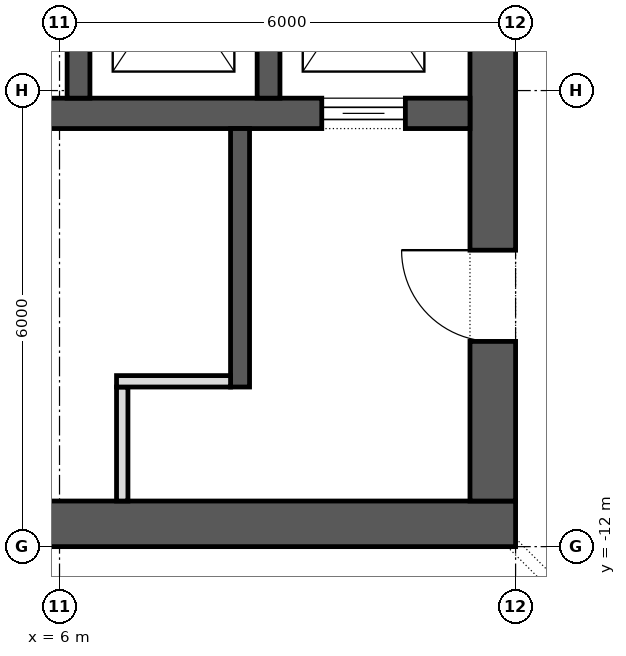
"""IFC4 building model, lengths in metres.
Left out: names, types, materials, properties, quantities, classifications, styles, units other than length and angle.
Written with IfcOpenShell. Run it as: python <this file> out.ifc"""

import sys

from ifc_helpers import new_model, si_unit, direction, frame, frame_2d, origin, place, context, subcontext, project, spatial, rectangle, extrude, element, fill, save


model = new_model("IFC4")
c1 = context("Model", 3, precision=1e-05, world=origin(), true_north=direction((0.0, 1.0)))
c2 = subcontext(c1, "Body", "Model", "MODEL_VIEW")
j1 = project(units=[si_unit("LENGTHUNIT", "METRE"), si_unit("PLANEANGLEUNIT", "RADIAN")], contexts=[c1])
p1 = place(None, origin())
s1 = spatial("IfcSite", under=j1, at=p1, CompositionType="ELEMENT")
p2 = place(p1, origin())
s2 = spatial("IfcBuilding", under=s1, at=p2, CompositionType="ELEMENT")
p3 = place(p2, frame((0.0, 0.0, -15.0)))
s3 = spatial("IfcBuildingStorey", under=s2, at=p3, CompositionType="ELEMENT", Elevation=-15.0)
p4 = place(p3, frame((-12.0, -11.7, 0.0), z_axis=(0.0, 0.0, 1.0), x_axis=(1.0, 0.0, 0.0)))
e1 = element("IfcWall", 1, at=p4, inside=s3, PredefinedType="SHEAR", context=c2, shape_type="SweptSolid", body=[
    extrude(rectangle(XDim=24.0, YDim=0.6, at=frame_2d((12.0, 0.0))), origin(), (0.0, 0.0, 1.0), 5.5),
])
p5 = place(p4, frame((11.6, 0.0, 0.0)))
e2 = element("IfcOpeningElement", 2, at=p5, cuts=e1, PredefinedType="OPENING", context=c2, shape_type="SweptSolid", body=[
    extrude(rectangle(XDim=0.8, YDim=2.1, at=frame_2d((0.4, 1.05))), frame((0.0, 0.312, 0.0), z_axis=(0.0, -1.0, 0.0), x_axis=(1.0, 0.0, 0.0)), (0.0, 0.0, 1.0), 0.624),
])
p6 = place(p3, frame((11.7, -11.4, 0.0), z_axis=(0.0, 0.0, 1.0), x_axis=(0.0, 1.0, 0.0)))
e3 = element("IfcWall", 3, at=p6, inside=s3, PredefinedType="SHEAR", context=c2, shape_type="SweptSolid", body=[
    extrude(rectangle(XDim=22.8, YDim=0.6, at=frame_2d((11.4, 0.0))), origin(), (0.0, 0.0, 1.0), 5.5),
])
p7 = place(p6, frame((10.2, 0.0, 0.0)))
e4 = element("IfcOpeningElement", 4, at=p7, cuts=e3, PredefinedType="OPENING", context=c2, shape_type="SweptSolid", body=[
    extrude(rectangle(XDim=2.4, YDim=2.1, at=frame_2d((1.2, 1.05))), frame((0.0, 0.312, 0.0), z_axis=(0.0, -1.0, 0.0), x_axis=(1.0, 0.0, 0.0)), (0.0, 0.0, 1.0), 0.624),
])
p8 = place(p6, frame((19.5, 0.0, 0.0)))
e5 = element("IfcOpeningElement", 5, at=p8, cuts=e3, PredefinedType="OPENING", context=c2, shape_type="SweptSolid", body=[
    extrude(rectangle(XDim=1.2, YDim=2.1, at=frame_2d((0.6, 1.05))), frame((0.0, 0.312, 0.0), z_axis=(0.0, -1.0, 0.0), x_axis=(1.0, 0.0, 0.0)), (0.0, 0.0, 1.0), 0.624),
])
p9 = place(p6, frame((2.1, 0.0, 0.0)))
e6 = element("IfcOpeningElement", 6, at=p9, cuts=e3, PredefinedType="OPENING", context=c2, shape_type="SweptSolid", body=[
    extrude(rectangle(XDim=1.2, YDim=2.1, at=frame_2d((0.6, 1.05))), frame((0.0, 0.312, 0.0), z_axis=(0.0, -1.0, 0.0), x_axis=(1.0, 0.0, 0.0)), (0.0, 0.0, 1.0), 0.624),
])
p10 = place(p3, frame((-11.4, -6.3, 0.0), z_axis=(0.0, 0.0, 1.0), x_axis=(1.0, 0.0, 0.0)))
e7 = element("IfcWall", 7, at=p10, inside=s3, PredefinedType="SHEAR", context=c2, shape_type="SweptSolid", body=[
    extrude(rectangle(XDim=22.8, YDim=0.4, at=frame_2d((11.4, 0.0))), origin(), (0.0, 0.0, 1.0), 5.5),
])
p11 = place(p10, frame((20.85, 0.0, 0.0)))
e8 = element("IfcOpeningElement", 8, at=p11, cuts=e7, PredefinedType="OPENING", context=c2, shape_type="SweptSolid", body=[
    extrude(rectangle(XDim=1.1, YDim=2.1, at=frame_2d((0.55, 1.05))), frame((0.0, 0.212, 0.0), z_axis=(0.0, -1.0, 0.0), x_axis=(1.0, 0.0, 0.0)), (0.0, 0.0, 1.0), 0.424),
])
for number, where, z_axis, x_axis in (
    (9, (6.25, -6.1, 0.0), (0.0, 0.0, 1.0), (0.0, 1.0, 0.0)),
    (10, (8.75, -6.1, 0.0), (0.0, 0.0, 1.0), (0.0, 1.0, 0.0)),
):
    element("IfcWall", number, at=place(p3, frame(where, z_axis=z_axis, x_axis=x_axis)), inside=s3, PredefinedType="SHEAR", context=c2, shape_type="SweptSolid", body=[
        extrude(rectangle(XDim=2.9, YDim=0.3, at=frame_2d((1.45, 0.0))), origin(), (0.0, 0.0, 1.0), 5.5),
    ])
p12 = place(p3, frame((8.375, -9.9, 0.0), z_axis=(0.0, 0.0, 1.0), x_axis=(0.0, 1.0, 0.0)))
e11 = element("IfcWall", 11, at=p12, inside=s3, PredefinedType="SHEAR", context=c2, shape_type="SweptSolid", body=[
    extrude(rectangle(XDim=3.4, YDim=0.25, at=frame_2d((1.7, 0.0))), origin(), (0.0, 0.0, 1.0), 5.15),
])
for number, where, z_axis, x_axis in (
    (12, (6.825, -11.4, 0.0), (0.0, 0.0, 1.0), (0.0, 1.0, 0.0)),
    (13, (6.75, -9.825, 0.0), (0.0, 0.0, 1.0), (1.0, 0.0, 0.0)),
):
    element("IfcWall", number, at=place(p3, frame(where, z_axis=z_axis, x_axis=x_axis)), inside=s3, PredefinedType="PARTITIONING", context=c2, shape_type="SweptSolid", body=[
        extrude(rectangle(XDim=1.5, YDim=0.15, at=frame_2d((0.75, 0.0))), origin(), (0.0, 0.0, 1.0), 5.15),
    ])
p13 = place(p11, origin())
e14 = element("IfcDoor", 14, at=p13, inside=s3, OperationType="SLIDING_TO_LEFT", PredefinedType="DOOR", context=c2, shape_type="SweptSolid", body=[
    extrude(rectangle(XDim=1.1, YDim=2.1, at=frame_2d((0.55, 1.05))), frame((0.0, 0.025, 0.0), z_axis=(0.0, -1.0, 0.0), x_axis=(1.0, 0.0, 0.0)), (0.0, 0.0, 1.0), 0.05),
])
fill(e8, e14)
p14 = place(p9, origin())
e15 = element("IfcDoor", 15, at=p14, inside=s3, OperationType="SINGLE_SWING_LEFT", PredefinedType="DOOR", context=c2, shape_type="SweptSolid", body=[
    extrude(rectangle(XDim=1.2, YDim=2.1, at=frame_2d((0.6, 1.05))), frame((0.0, 0.025, 0.0), z_axis=(0.0, -1.0, 0.0), x_axis=(1.0, 0.0, 0.0)), (0.0, 0.0, 1.0), 0.05),
])
fill(e6, e15)
save(model, sys.argv[1])
